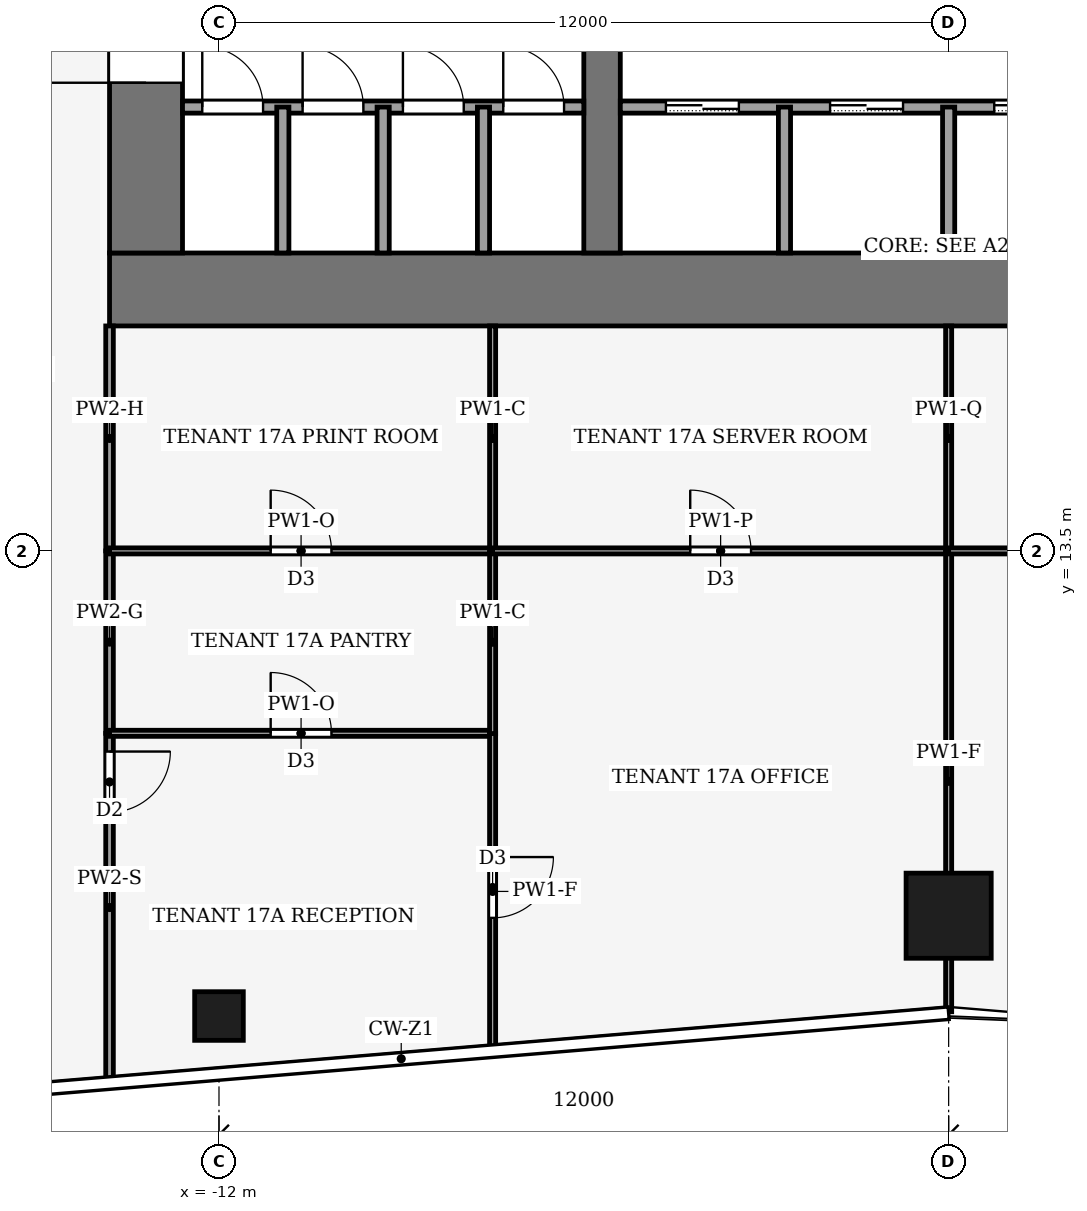
"""IFC4 building model, lengths in metres.
Left out: names, types, materials, properties, quantities, classifications, styles, units other than length and angle.
Written with IfcOpenShell. Run it as: python <this file> out.ifc"""

import sys

from ifc_helpers import new_model, si_unit, direction, frame, frame_2d, origin, origin_2d, place, context, subcontext, project, spatial, rectangle, hollow_rectangle, extrude, element, fill, save


model = new_model("IFC4")
c1 = context("Model", 3, precision=1e-05, world=origin(), true_north=direction((0.0, 1.0)))
c2 = subcontext(c1, "Body", "Model", "MODEL_VIEW")
j1 = project(units=[si_unit("LENGTHUNIT", "METRE"), si_unit("PLANEANGLEUNIT", "RADIAN")], contexts=[c1])
p1 = place(None, origin())
s1 = spatial("IfcSite", under=j1, at=p1, CompositionType="ELEMENT")
p2 = place(p1, origin())
s2 = spatial("IfcBuilding", under=s1, at=p2, CompositionType="ELEMENT")
p3 = place(p2, frame((0.0, 0.0, 78.0)))
s3 = spatial("IfcBuildingStorey", under=s2, at=p3, CompositionType="ELEMENT", Elevation=78.0)
p4 = place(p3, frame((-13.8, 17.8, -0.13), z_axis=(0.0, 0.0, 1.0), x_axis=(1.0, 0.0, 0.0)))
e1 = element("IfcWall", 1, at=p4, inside=s3, PredefinedType="SHEAR", context=c2, shape_type="SweptSolid", body=[
    extrude(rectangle(XDim=27.6, YDim=1.2, at=frame_2d((13.8, 0.0))), origin(), (0.0, 0.0, 1.0), 4.0),
])
p5 = place(p3, frame((-13.2, 18.4, -0.13), z_axis=(0.0, 0.0, 1.0), x_axis=(0.0, 1.0, 0.0)))
e2 = element("IfcWall", 2, at=p5, inside=s3, PredefinedType="SHEAR", context=c2, shape_type="SweptSolid", body=[
    extrude(rectangle(XDim=19.2, YDim=1.2, at=frame_2d((9.6, 0.0))), origin(), (0.0, 0.0, 1.0), 4.0),
])
p6 = place(p5, frame((2.8, 0.0, 0.13)))
e3 = element("IfcOpeningElement", 3, at=p6, cuts=e2, PredefinedType="OPENING", context=c2, shape_type="SweptSolid", body=[
    extrude(rectangle(XDim=2.4, YDim=2.4, at=frame_2d((1.2, 1.2))), frame((0.0, 0.61, 0.0), z_axis=(0.0, -1.0, 0.0), x_axis=(1.0, 0.0, 0.0)), (0.0, 0.0, 1.0), 1.22),
])
p7 = place(p5, frame((13.4, 0.0, 0.13)))
e4 = element("IfcOpeningElement", 4, at=p7, cuts=e2, PredefinedType="OPENING", context=c2, shape_type="SweptSolid", body=[
    extrude(rectangle(XDim=1.4, YDim=2.2, at=frame_2d((0.7, 1.1))), frame((0.0, 0.61, 0.0), z_axis=(0.0, -1.0, 0.0), x_axis=(1.0, 0.0, 0.0)), (0.0, 0.0, 1.0), 1.22),
])
p8 = place(p3, frame((-5.7, 18.4, -0.13), z_axis=(0.0, 0.0, 1.0), x_axis=(0.0, 1.0, 0.0)))
e5 = element("IfcWall", 5, at=p8, inside=s3, PredefinedType="SHEAR", context=c2, shape_type="SweptSolid", body=[
    extrude(rectangle(XDim=19.2, YDim=0.6, at=frame_2d((9.6, 0.0))), origin(), (0.0, 0.0, 1.0), 4.0),
])
p9 = place(p8, frame((8.35, 0.0, 0.13)))
e6 = element("IfcOpeningElement", 6, at=p9, cuts=e5, PredefinedType="OPENING", context=c2, shape_type="SweptSolid", body=[
    extrude(rectangle(XDim=0.9, YDim=2.1, at=frame_2d((0.45, 1.05))), frame((0.0, 0.31, 0.0), z_axis=(0.0, -1.0, 0.0), x_axis=(1.0, 0.0, 0.0)), (0.0, 0.0, 1.0), 0.62),
])
p10 = place(p3, frame((0.0, 7.5, 0.0), z_axis=(0.0, 0.0, 1.0), x_axis=(1.0, 0.0, 0.0)))
e7 = element("IfcColumn", 7, at=p10, inside=s3, PredefinedType="COLUMN", context=c2, shape_type="SweptSolid", body=[
    extrude(hollow_rectangle(XDim=1.4, YDim=1.4, WallThickness=0.08, at=origin_2d()), origin(), (0.0, 0.0, 1.0), 4.0),
])
p11 = place(p3, frame((-12.0, 5.85, 0.0), z_axis=(0.0, 0.0, 1.0), x_axis=(1.0, 0.0, 0.0)))
e8 = element("IfcColumn", 8, at=p11, inside=s3, PredefinedType="COLUMN", context=c2, shape_type="SweptSolid", body=[
    extrude(hollow_rectangle(XDim=0.8, YDim=0.8, WallThickness=0.04, at=origin_2d()), origin(), (0.0, 0.0, 1.0), 4.0),
])
p12 = place(p3, frame((-12.6, 20.8, 0.0), z_axis=(0.0, 0.0, 1.0), x_axis=(1.0, 0.0, 0.0)))
e9 = element("IfcWall", 9, at=p12, inside=s3, PredefinedType="PARTITIONING", context=c2, shape_type="SweptSolid", body=[
    extrude(rectangle(XDim=6.6, YDim=0.2, at=frame_2d((3.3, 0.0))), origin(), (0.0, 0.0, 1.0), 3.87),
])
p13 = place(p12, frame((0.325, 0.0, 0.0)))
e10 = element("IfcOpeningElement", 10, at=p13, cuts=e9, PredefinedType="OPENING", context=c2, shape_type="SweptSolid", body=[
    extrude(rectangle(XDim=1.0, YDim=2.1, at=frame_2d((0.5, 1.05))), frame((0.0, 0.11, 0.0), z_axis=(0.0, -1.0, 0.0), x_axis=(1.0, 0.0, 0.0)), (0.0, 0.0, 1.0), 0.22),
])
p14 = place(p12, frame((1.975, 0.0, 0.0)))
e11 = element("IfcOpeningElement", 11, at=p14, cuts=e9, PredefinedType="OPENING", context=c2, shape_type="SweptSolid", body=[
    extrude(rectangle(XDim=1.0, YDim=2.1, at=frame_2d((0.5, 1.05))), frame((0.0, 0.11, 0.0), z_axis=(0.0, -1.0, 0.0), x_axis=(1.0, 0.0, 0.0)), (0.0, 0.0, 1.0), 0.22),
])
p15 = place(p12, frame((3.625, 0.0, 0.0)))
e12 = element("IfcOpeningElement", 12, at=p15, cuts=e9, PredefinedType="OPENING", context=c2, shape_type="SweptSolid", body=[
    extrude(rectangle(XDim=1.0, YDim=2.1, at=frame_2d((0.5, 1.05))), frame((0.0, 0.11, 0.0), z_axis=(0.0, -1.0, 0.0), x_axis=(1.0, 0.0, 0.0)), (0.0, 0.0, 1.0), 0.22),
])
p16 = place(p12, frame((5.275, 0.0, 0.0)))
e13 = element("IfcOpeningElement", 13, at=p16, cuts=e9, PredefinedType="OPENING", context=c2, shape_type="SweptSolid", body=[
    extrude(rectangle(XDim=1.0, YDim=2.1, at=frame_2d((0.5, 1.05))), frame((0.0, 0.11, 0.0), z_axis=(0.0, -1.0, 0.0), x_axis=(1.0, 0.0, 0.0)), (0.0, 0.0, 1.0), 0.22),
])
p17 = place(p3, frame((-5.4, 20.8, 0.0), z_axis=(0.0, 0.0, 1.0), x_axis=(1.0, 0.0, 0.0)))
e14 = element("IfcWall", 14, at=p17, inside=s3, PredefinedType="PARTITIONING", context=c2, shape_type="SweptSolid", body=[
    extrude(rectangle(XDim=10.8, YDim=0.2, at=frame_2d((5.4, 0.0))), origin(), (0.0, 0.0, 1.0), 3.87),
])
p18 = place(p17, frame((0.75, 0.0, 0.0)))
e15 = element("IfcOpeningElement", 15, at=p18, cuts=e14, PredefinedType="OPENING", context=c2, shape_type="SweptSolid", body=[
    extrude(rectangle(XDim=1.2, YDim=2.2, at=frame_2d((0.6, 1.1))), frame((0.0, 0.11, 0.0), z_axis=(0.0, -1.0, 0.0), x_axis=(1.0, 0.0, 0.0)), (0.0, 0.0, 1.0), 0.22),
])
p19 = place(p17, frame((3.45, 0.0, 0.0)))
e16 = element("IfcOpeningElement", 16, at=p19, cuts=e14, PredefinedType="OPENING", context=c2, shape_type="SweptSolid", body=[
    extrude(rectangle(XDim=1.2, YDim=2.2, at=frame_2d((0.6, 1.1))), frame((0.0, 0.11, 0.0), z_axis=(0.0, -1.0, 0.0), x_axis=(1.0, 0.0, 0.0)), (0.0, 0.0, 1.0), 0.22),
])
p20 = place(p17, frame((6.15, 0.0, 0.0)))
e17 = element("IfcOpeningElement", 17, at=p20, cuts=e14, PredefinedType="OPENING", context=c2, shape_type="SweptSolid", body=[
    extrude(rectangle(XDim=1.2, YDim=2.2, at=frame_2d((0.6, 1.1))), frame((0.0, 0.11, 0.0), z_axis=(0.0, -1.0, 0.0), x_axis=(1.0, 0.0, 0.0)), (0.0, 0.0, 1.0), 0.22),
])
p21 = place(p17, frame((8.85, 0.0, 0.0)))
e18 = element("IfcOpeningElement", 18, at=p21, cuts=e14, PredefinedType="OPENING", context=c2, shape_type="SweptSolid", body=[
    extrude(rectangle(XDim=1.2, YDim=2.2, at=frame_2d((0.6, 1.1))), frame((0.0, 0.11, 0.0), z_axis=(0.0, -1.0, 0.0), x_axis=(1.0, 0.0, 0.0)), (0.0, 0.0, 1.0), 0.22),
])
for number, where, z_axis, x_axis in (
    (19, (-10.95, 18.4, 0.0), (0.0, 0.0, 1.0), (0.0, 1.0, 0.0)),
    (20, (-9.3, 18.4, 0.0), (0.0, 0.0, 1.0), (0.0, 1.0, 0.0)),
    (21, (-7.65, 18.4, 0.0), (0.0, 0.0, 1.0), (0.0, 1.0, 0.0)),
    (22, (-2.7, 18.4, 0.0), (0.0, 0.0, 1.0), (0.0, 1.0, 0.0)),
    (23, (0.0, 18.4, 0.0), (0.0, 0.0, 1.0), (0.0, 1.0, 0.0)),
):
    element("IfcWall", number, at=place(p3, frame(where, z_axis=z_axis, x_axis=x_axis)), inside=s3, PredefinedType="PARTITIONING", context=c2, shape_type="SweptSolid", body=[
        extrude(rectangle(XDim=2.4, YDim=0.2, at=frame_2d((1.2, 0.0))), origin(), (0.0, 0.0, 1.0), 3.87),
    ])
p22 = place(p3, frame((-13.8, 10.5, 0.0), z_axis=(0.0, 0.0, 1.0), x_axis=(0.0, -1.0, 0.0)))
e24 = element("IfcWall", 24, at=p22, inside=s3, PredefinedType="PARTITIONING", context=c2, shape_type="SweptSolid", body=[
    extrude(rectangle(XDim=5.73, YDim=0.125, at=frame_2d((2.865, 0.0))), origin(), (0.0, 0.0, 1.0), 3.04),
])
p23 = place(p22, frame((0.3, 0.0, 0.0)))
e25 = element("IfcOpeningElement", 25, at=p23, cuts=e24, PredefinedType="OPENING", context=c2, shape_type="SweptSolid", body=[
    extrude(rectangle(XDim=1.0, YDim=2.1, at=frame_2d((0.5, 1.05))), frame((0.0, 0.073, 0.0), z_axis=(0.0, -1.0, 0.0), x_axis=(1.0, 0.0, 0.0)), (0.0, 0.0, 1.0), 0.145),
])
p24 = place(p3, frame((-13.8, 10.5, 0.0), z_axis=(0.0, 0.0, 1.0), x_axis=(0.0, 1.0, 0.0)))
e26 = element("IfcWall", 26, at=p24, inside=s3, PredefinedType="PARTITIONING", context=c2, shape_type="SweptSolid", body=[
    extrude(rectangle(XDim=3.0, YDim=0.125, at=frame_2d((1.5, 0.0))), origin(), (0.0, 0.0, 1.0), 3.87),
])
p25 = place(p3, frame((-13.8, 13.5, 0.0), z_axis=(0.0, 0.0, 1.0), x_axis=(0.0, 1.0, 0.0)))
e27 = element("IfcWall", 27, at=p25, inside=s3, PredefinedType="PARTITIONING", context=c2, shape_type="SweptSolid", body=[
    extrude(rectangle(XDim=3.7, YDim=0.125, at=frame_2d((1.85, 0.0))), origin(), (0.0, 0.0, 1.0), 3.14),
])
p26 = place(p3, frame((-13.8, 10.5, 0.0), z_axis=(0.0, 0.0, 1.0), x_axis=(1.0, 0.0, 0.0)))
e28 = element("IfcWall", 28, at=p26, inside=s3, PredefinedType="PARTITIONING", context=c2, shape_type="SweptSolid", body=[
    extrude(rectangle(XDim=6.3, YDim=0.1, at=frame_2d((3.15, 0.0))), origin(), (0.0, 0.0, 1.0), 3.39),
])
p27 = place(p26, frame((2.65, 0.0, 0.0)))
e29 = element("IfcOpeningElement", 29, at=p27, cuts=e28, PredefinedType="OPENING", context=c2, shape_type="SweptSolid", body=[
    extrude(rectangle(XDim=1.0, YDim=2.1, at=frame_2d((0.5, 1.05))), frame((0.0, 0.06, 0.0), z_axis=(0.0, -1.0, 0.0), x_axis=(1.0, 0.0, 0.0)), (0.0, 0.0, 1.0), 0.12),
])
p28 = place(p3, frame((-7.5, 10.504, 0.0), z_axis=(0.0, 0.0, 1.0), x_axis=(0.0, -1.0, 0.0)))
e30 = element("IfcWall", 30, at=p28, inside=s3, PredefinedType="PARTITIONING", context=c2, shape_type="SweptSolid", body=[
    extrude(rectangle(XDim=5.209, YDim=0.1, at=frame_2d((2.604, 0.0))), origin(), (0.0, 0.0, 1.0), 3.04),
])
p29 = place(p28, frame((2.039, 0.0, 0.0)))
e31 = element("IfcOpeningElement", 31, at=p29, cuts=e30, PredefinedType="OPENING", context=c2, shape_type="SweptSolid", body=[
    extrude(rectangle(XDim=1.0, YDim=2.1, at=frame_2d((0.5, 1.05))), frame((0.0, 0.06, 0.0), z_axis=(0.0, -1.0, 0.0), x_axis=(1.0, 0.0, 0.0)), (0.0, 0.0, 1.0), 0.12),
])
p30 = place(p3, frame((-13.8, 13.5, 0.0), z_axis=(0.0, 0.0, 1.0), x_axis=(1.0, 0.0, 0.0)))
e32 = element("IfcWall", 32, at=p30, inside=s3, PredefinedType="PARTITIONING", context=c2, shape_type="SweptSolid", body=[
    extrude(rectangle(XDim=6.3, YDim=0.1, at=frame_2d((3.15, 0.0))), origin(), (0.0, 0.0, 1.0), 3.39),
])
p31 = place(p30, frame((2.65, 0.0, 0.0)))
e33 = element("IfcOpeningElement", 33, at=p31, cuts=e32, PredefinedType="OPENING", context=c2, shape_type="SweptSolid", body=[
    extrude(rectangle(XDim=1.0, YDim=2.1, at=frame_2d((0.5, 1.05))), frame((0.0, 0.06, 0.0), z_axis=(0.0, -1.0, 0.0), x_axis=(1.0, 0.0, 0.0)), (0.0, 0.0, 1.0), 0.12),
])
p32 = place(p3, frame((-7.5, 10.496, 0.0), z_axis=(0.0, 0.0, 1.0), x_axis=(0.0, 1.0, 0.0)))
e34 = element("IfcWall", 34, at=p32, inside=s3, PredefinedType="PARTITIONING", context=c2, shape_type="SweptSolid", body=[
    extrude(rectangle(XDim=3.004, YDim=0.1, at=frame_2d((1.502, 0.0))), origin(), (0.0, 0.0, 1.0), 3.87),
])
p33 = place(p3, frame((-7.5, 13.5, 0.0), z_axis=(0.0, 0.0, 1.0), x_axis=(0.0, 1.0, 0.0)))
e35 = element("IfcWall", 35, at=p33, inside=s3, PredefinedType="PARTITIONING", context=c2, shape_type="SweptSolid", body=[
    extrude(rectangle(XDim=3.7, YDim=0.1, at=frame_2d((1.85, 0.0))), origin(), (0.0, 0.0, 1.0), 3.87),
])
p34 = place(p3, frame((-7.5, 13.5, 0.0), z_axis=(0.0, 0.0, 1.0), x_axis=(1.0, 0.0, 0.0)))
e36 = element("IfcWall", 36, at=p34, inside=s3, PredefinedType="PARTITIONING", context=c2, shape_type="SweptSolid", body=[
    extrude(rectangle(XDim=7.5, YDim=0.1, at=frame_2d((3.75, 0.0))), origin(), (0.0, 0.0, 1.0), 3.44),
])
p35 = place(p34, frame((3.25, 0.0, 0.0)))
e37 = element("IfcOpeningElement", 37, at=p35, cuts=e36, PredefinedType="OPENING", context=c2, shape_type="SweptSolid", body=[
    extrude(rectangle(XDim=1.0, YDim=2.1, at=frame_2d((0.5, 1.05))), frame((0.0, 0.06, 0.0), z_axis=(0.0, -1.0, 0.0), x_axis=(1.0, 0.0, 0.0)), (0.0, 0.0, 1.0), 0.12),
])
p36 = place(p3, frame((0.0, 5.92, 0.0), z_axis=(0.0, 0.0, 1.0), x_axis=(0.0, 1.0, 0.0)))
e38 = element("IfcWall", 38, at=p36, inside=s3, PredefinedType="PARTITIONING", context=c2, shape_type="SweptSolid", body=[
    extrude(rectangle(XDim=7.58, YDim=0.1, at=frame_2d((3.79, 0.0))), origin(), (0.0, 0.0, 1.0), 3.04),
])
p37 = place(p3, frame((0.0, 13.5, 0.0), z_axis=(0.0, 0.0, 1.0), x_axis=(0.0, 1.0, 0.0)))
e39 = element("IfcWall", 39, at=p37, inside=s3, PredefinedType="PARTITIONING", context=c2, shape_type="SweptSolid", body=[
    extrude(rectangle(XDim=3.7, YDim=0.1, at=frame_2d((1.85, 0.0))), origin(), (0.0, 0.0, 1.0), 3.48),
])
p38 = place(p3, frame((0.0, 13.5, 0.0), z_axis=(0.0, 0.0, 1.0), x_axis=(1.0, 0.0, 0.0)))
e40 = element("IfcWall", 40, at=p38, inside=s3, PredefinedType="PARTITIONING", context=c2, shape_type="SweptSolid", body=[
    extrude(rectangle(XDim=7.5, YDim=0.1, at=frame_2d((3.75, 0.0))), origin(), (0.0, 0.0, 1.0), 3.44),
])
p39 = place(p38, frame((3.25, 0.0, 0.0)))
e41 = element("IfcOpeningElement", 41, at=p39, cuts=e40, PredefinedType="OPENING", context=c2, shape_type="SweptSolid", body=[
    extrude(rectangle(XDim=1.0, YDim=2.1, at=frame_2d((0.5, 1.05))), frame((0.0, 0.06, 0.0), z_axis=(0.0, -1.0, 0.0), x_axis=(1.0, 0.0, 0.0)), (0.0, 0.0, 1.0), 0.12),
])
p40 = place(p18, origin())
e42 = element("IfcDoor", 42, at=p40, inside=s3, OperationType="SLIDING_TO_LEFT", PredefinedType="DOOR", context=c2, shape_type="SweptSolid", body=[
    extrude(rectangle(XDim=1.2, YDim=2.2, at=frame_2d((0.6, 1.1))), frame((0.0, 0.025, 0.0), z_axis=(0.0, -1.0, 0.0), x_axis=(1.0, 0.0, 0.0)), (0.0, 0.0, 1.0), 0.05),
])
fill(e15, e42)
p41 = place(p19, origin())
e43 = element("IfcDoor", 43, at=p41, inside=s3, OperationType="SLIDING_TO_LEFT", PredefinedType="DOOR", context=c2, shape_type="SweptSolid", body=[
    extrude(rectangle(XDim=1.2, YDim=2.2, at=frame_2d((0.6, 1.1))), frame((0.0, 0.025, 0.0), z_axis=(0.0, -1.0, 0.0), x_axis=(1.0, 0.0, 0.0)), (0.0, 0.0, 1.0), 0.05),
])
fill(e16, e43)
p42 = place(p20, origin())
e44 = element("IfcDoor", 44, at=p42, inside=s3, OperationType="SLIDING_TO_LEFT", PredefinedType="DOOR", context=c2, shape_type="SweptSolid", body=[
    extrude(rectangle(XDim=1.2, YDim=2.2, at=frame_2d((0.6, 1.1))), frame((0.0, 0.025, 0.0), z_axis=(0.0, -1.0, 0.0), x_axis=(1.0, 0.0, 0.0)), (0.0, 0.0, 1.0), 0.05),
])
fill(e17, e44)
p43 = place(p13, origin())
e45 = element("IfcDoor", 45, at=p43, inside=s3, OperationType="SINGLE_SWING_RIGHT", PredefinedType="DOOR", context=c2, shape_type="SweptSolid", body=[
    extrude(rectangle(XDim=1.0, YDim=2.1, at=frame_2d((0.5, 1.05))), frame((0.0, 0.025, 0.0), z_axis=(0.0, -1.0, 0.0), x_axis=(1.0, 0.0, 0.0)), (0.0, 0.0, 1.0), 0.05),
])
fill(e10, e45)
p44 = place(p14, origin())
e46 = element("IfcDoor", 46, at=p44, inside=s3, OperationType="SINGLE_SWING_RIGHT", PredefinedType="DOOR", context=c2, shape_type="SweptSolid", body=[
    extrude(rectangle(XDim=1.0, YDim=2.1, at=frame_2d((0.5, 1.05))), frame((0.0, 0.025, 0.0), z_axis=(0.0, -1.0, 0.0), x_axis=(1.0, 0.0, 0.0)), (0.0, 0.0, 1.0), 0.05),
])
fill(e11, e46)
p45 = place(p15, origin())
e47 = element("IfcDoor", 47, at=p45, inside=s3, OperationType="SINGLE_SWING_LEFT", PredefinedType="DOOR", context=c2, shape_type="SweptSolid", body=[
    extrude(rectangle(XDim=1.0, YDim=2.1, at=frame_2d((0.5, 1.05))), frame((0.0, 0.025, 0.0), z_axis=(0.0, -1.0, 0.0), x_axis=(1.0, 0.0, 0.0)), (0.0, 0.0, 1.0), 0.05),
])
fill(e12, e47)
p46 = place(p16, origin())
e48 = element("IfcDoor", 48, at=p46, inside=s3, OperationType="SINGLE_SWING_LEFT", PredefinedType="DOOR", context=c2, shape_type="SweptSolid", body=[
    extrude(rectangle(XDim=1.0, YDim=2.1, at=frame_2d((0.5, 1.05))), frame((0.0, 0.025, 0.0), z_axis=(0.0, -1.0, 0.0), x_axis=(1.0, 0.0, 0.0)), (0.0, 0.0, 1.0), 0.05),
])
fill(e13, e48)
p47 = place(p6, origin())
e49 = element("IfcDoor", 49, at=p47, inside=s3, OperationType="DOUBLE_DOOR_SINGLE_SWING", PredefinedType="DOOR", context=c2, shape_type="SweptSolid", body=[
    extrude(rectangle(XDim=2.4, YDim=2.4, at=frame_2d((1.2, 1.2))), frame((0.0, 0.025, 0.0), z_axis=(0.0, -1.0, 0.0), x_axis=(1.0, 0.0, 0.0)), (0.0, 0.0, 1.0), 0.05),
])
fill(e3, e49)
p48 = place(p23, origin())
e50 = element("IfcDoor", 50, at=p48, inside=s3, OperationType="SINGLE_SWING_LEFT", PredefinedType="DOOR", context=c2, shape_type="SweptSolid", body=[
    extrude(rectangle(XDim=1.0, YDim=2.1, at=frame_2d((0.5, 1.05))), frame((0.0, 0.025, 0.0), z_axis=(0.0, -1.0, 0.0), x_axis=(1.0, 0.0, 0.0)), (0.0, 0.0, 1.0), 0.05),
])
fill(e25, e50)
p49 = place(p27, origin())
e51 = element("IfcDoor", 51, at=p49, inside=s3, OperationType="SINGLE_SWING_LEFT", PredefinedType="DOOR", context=c2, shape_type="SweptSolid", body=[
    extrude(rectangle(XDim=1.0, YDim=2.1, at=frame_2d((0.5, 1.05))), frame((0.0, 0.025, 0.0), z_axis=(0.0, -1.0, 0.0), x_axis=(1.0, 0.0, 0.0)), (0.0, 0.0, 1.0), 0.05),
])
fill(e29, e51)
p50 = place(p29, origin())
e52 = element("IfcDoor", 52, at=p50, inside=s3, OperationType="SINGLE_SWING_LEFT", PredefinedType="DOOR", context=c2, shape_type="SweptSolid", body=[
    extrude(rectangle(XDim=1.0, YDim=2.1, at=frame_2d((0.5, 1.05))), frame((0.0, 0.025, 0.0), z_axis=(0.0, -1.0, 0.0), x_axis=(1.0, 0.0, 0.0)), (0.0, 0.0, 1.0), 0.05),
])
fill(e31, e52)
p51 = place(p31, origin())
e53 = element("IfcDoor", 53, at=p51, inside=s3, OperationType="SINGLE_SWING_LEFT", PredefinedType="DOOR", context=c2, shape_type="SweptSolid", body=[
    extrude(rectangle(XDim=1.0, YDim=2.1, at=frame_2d((0.5, 1.05))), frame((0.0, 0.025, 0.0), z_axis=(0.0, -1.0, 0.0), x_axis=(1.0, 0.0, 0.0)), (0.0, 0.0, 1.0), 0.05),
])
fill(e33, e53)
p52 = place(p35, origin())
e54 = element("IfcDoor", 54, at=p52, inside=s3, OperationType="SINGLE_SWING_RIGHT", PredefinedType="DOOR", context=c2, shape_type="SweptSolid", body=[
    extrude(rectangle(XDim=1.0, YDim=2.1, at=frame_2d((0.5, 1.05))), frame((0.0, 0.025, 0.0), z_axis=(0.0, -1.0, 0.0), x_axis=(1.0, 0.0, 0.0)), (0.0, 0.0, 1.0), 0.05),
])
fill(e37, e54)
save(model, sys.argv[1])
